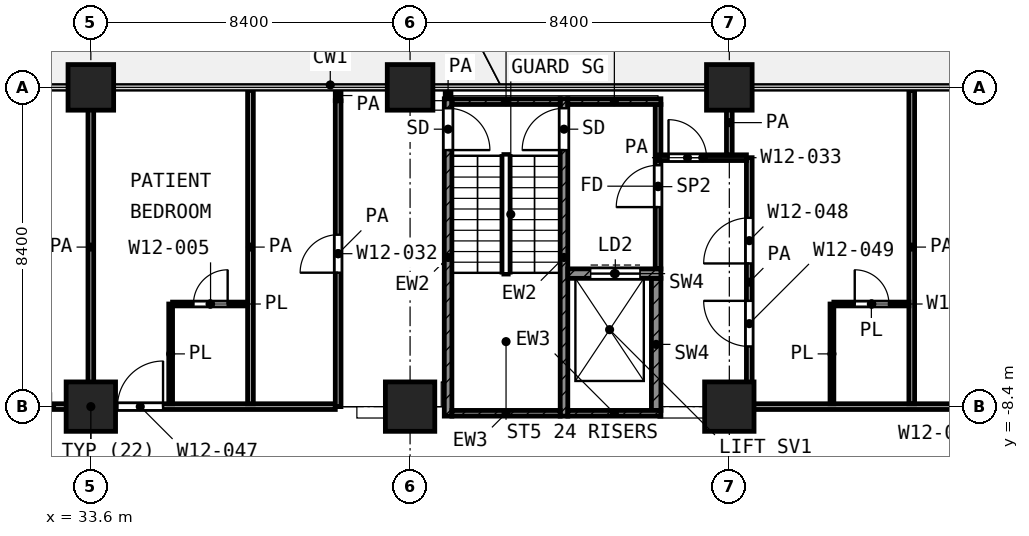
"""IFC4 building model, lengths in metres.
Left out: names, types, materials, properties, quantities, classifications, styles, units other than length and angle.
Written with IfcOpenShell. Run it as: python <this file> out.ifc"""

import sys

from ifc_helpers import new_model, si_unit, direction, frame, frame_2d, origin, origin_2d, place, context, subcontext, project, spatial, rectangle, extrude, element, fill, save


model = new_model("IFC4")
c1 = context("Model", 3, precision=1e-05, world=origin(), true_north=direction((0.0, 1.0)))
c2 = subcontext(c1, "Body", "Model", "MODEL_VIEW")
j1 = project(units=[si_unit("LENGTHUNIT", "METRE"), si_unit("PLANEANGLEUNIT", "RADIAN")], contexts=[c1])
p1 = place(None, origin())
s1 = spatial("IfcSite", under=j1, at=p1, CompositionType="ELEMENT")
p2 = place(p1, origin())
s2 = spatial("IfcBuilding", under=s1, at=p2, CompositionType="ELEMENT")
p3 = place(p2, frame((0.0, 0.0, 77.0)))
s3 = spatial("IfcBuildingStorey", under=s2, at=p3, CompositionType="ELEMENT", Elevation=77.0)
for number, where, z_axis, x_axis in (
    (1, (33.6, 0.0, 0.0), (0.0, 0.0, 1.0), (1.0, 0.0, 0.0)),
    (2, (42.0, 0.0, 0.0), (0.0, 0.0, 1.0), (1.0, 0.0, 0.0)),
    (3, (50.4, 0.0, 0.0), (0.0, 0.0, 1.0), (1.0, 0.0, 0.0)),
):
    element("IfcColumn", number, at=place(p3, frame(where, z_axis=z_axis, x_axis=x_axis)), inside=s3, PredefinedType="COLUMN", context=c2, shape_type="SweptSolid", body=[
        extrude(rectangle(XDim=1.2, YDim=1.2, at=origin_2d()), origin(), (0.0, 0.0, 1.0), 4.2),
    ])
for number, where, z_axis, x_axis in (
    (4, (33.6, -8.4, 0.0), (0.0, 0.0, 1.0), (1.0, 0.0, 0.0)),
    (5, (42.0, -8.4, 0.0), (0.0, 0.0, 1.0), (1.0, 0.0, 0.0)),
    (6, (50.4, -8.4, 0.0), (0.0, 0.0, 1.0), (1.0, 0.0, 0.0)),
):
    element("IfcColumn", number, at=place(p3, frame(where, z_axis=z_axis, x_axis=x_axis)), inside=s3, PredefinedType="COLUMN", context=c2, shape_type="SweptSolid", body=[
        extrude(rectangle(XDim=1.3, YDim=1.3, at=origin_2d()), origin(), (0.0, 0.0, 1.0), 4.2),
    ])
p4 = place(p3, frame((43.0, -8.65, 0.0), z_axis=(0.0, 0.0, 1.0), x_axis=(0.0, 1.0, 0.0)))
e7 = element("IfcWall", 7, at=p4, inside=s3, PredefinedType="SHEAR", context=c2, shape_type="SweptSolid", body=[
    extrude(rectangle(XDim=8.35, YDim=0.2, at=frame_2d((4.175, 0.0))), origin(), (0.0, 0.0, 1.0), 3.9),
])
p5 = place(p4, frame((7.0, 0.0, 0.0)))
e8 = element("IfcOpeningElement", 8, at=p5, cuts=e7, PredefinedType="OPENING", context=c2, shape_type="SweptSolid", body=[
    extrude(rectangle(XDim=1.1, YDim=2.1, at=frame_2d((0.55, 1.05))), frame((0.0, 0.11, 0.0), z_axis=(0.0, -1.0, 0.0), x_axis=(1.0, 0.0, 0.0)), (0.0, 0.0, 1.0), 0.22),
])
p6 = place(p3, frame((46.05, -8.65, 0.0), z_axis=(0.0, 0.0, 1.0), x_axis=(0.0, 1.0, 0.0)))
e9 = element("IfcWall", 9, at=p6, inside=s3, PredefinedType="SHEAR", context=c2, shape_type="SweptSolid", body=[
    extrude(rectangle(XDim=8.35, YDim=0.2, at=frame_2d((4.175, 0.0))), origin(), (0.0, 0.0, 1.0), 3.9),
])
p7 = place(p6, frame((7.0, 0.0, 0.0)))
e10 = element("IfcOpeningElement", 10, at=p7, cuts=e9, PredefinedType="OPENING", context=c2, shape_type="SweptSolid", body=[
    extrude(rectangle(XDim=1.1, YDim=2.1, at=frame_2d((0.55, 1.05))), frame((0.0, 0.11, 0.0), z_axis=(0.0, -1.0, 0.0), x_axis=(1.0, 0.0, 0.0)), (0.0, 0.0, 1.0), 0.22),
])
p8 = place(p3, frame((43.1, -0.375, 0.0), z_axis=(0.0, 0.0, 1.0), x_axis=(1.0, 0.0, 0.0)))
e11 = element("IfcWall", 11, at=p8, inside=s3, PredefinedType="SHEAR", context=c2, shape_type="SweptSolid", body=[
    extrude(rectangle(XDim=2.85, YDim=0.15, at=frame_2d((1.425, 0.0))), origin(), (0.0, 0.0, 1.0), 3.9),
])
p9 = place(p3, frame((46.15, -0.375, 0.0), z_axis=(0.0, 0.0, 1.0), x_axis=(1.0, 0.0, 0.0)))
e12 = element("IfcWall", 12, at=p9, inside=s3, PredefinedType="SHEAR", context=c2, shape_type="SweptSolid", body=[
    extrude(rectangle(XDim=2.45, YDim=0.15, at=frame_2d((1.225, 0.0))), origin(), (0.0, 0.0, 1.0), 3.9),
])
p10 = place(p3, frame((43.1, -8.575, 0.0), z_axis=(0.0, 0.0, 1.0), x_axis=(1.0, 0.0, 0.0)))
e13 = element("IfcWall", 13, at=p10, inside=s3, PredefinedType="SHEAR", context=c2, shape_type="SweptSolid", body=[
    extrude(rectangle(XDim=2.85, YDim=0.15, at=frame_2d((1.425, 0.0))), origin(), (0.0, 0.0, 1.0), 3.9),
])
p11 = place(p3, frame((46.15, -8.575, 0.0), z_axis=(0.0, 0.0, 1.0), x_axis=(1.0, 0.0, 0.0)))
e14 = element("IfcWall", 14, at=p11, inside=s3, PredefinedType="SHEAR", context=c2, shape_type="SweptSolid", body=[
    extrude(rectangle(XDim=2.45, YDim=0.15, at=frame_2d((1.225, 0.0))), origin(), (0.0, 0.0, 1.0), 3.9),
])
p12 = place(p3, frame((46.15, -4.9, 0.0), z_axis=(0.0, 0.0, 1.0), x_axis=(1.0, 0.0, 0.0)))
e15 = element("IfcWall", 15, at=p12, inside=s3, PredefinedType="SHEAR", context=c2, shape_type="SweptSolid", body=[
    extrude(rectangle(XDim=2.45, YDim=0.25, at=frame_2d((1.225, 0.0))), origin(), (0.0, 0.0, 1.0), 3.9),
])
p13 = place(p12, frame((0.6, 0.0, 0.0)))
e16 = element("IfcOpeningElement", 16, at=p13, cuts=e15, PredefinedType="OPENING", context=c2, shape_type="SweptSolid", body=[
    extrude(rectangle(XDim=1.3, YDim=2.1, at=frame_2d((0.65, 1.05))), frame((0.0, 0.135, 0.0), z_axis=(0.0, -1.0, 0.0), x_axis=(1.0, 0.0, 0.0)), (0.0, 0.0, 1.0), 0.27),
])
p14 = place(p3, frame((48.475, -8.5, 0.0), z_axis=(0.0, 0.0, 1.0), x_axis=(0.0, 1.0, 0.0)))
e17 = element("IfcWall", 17, at=p14, inside=s3, PredefinedType="SHEAR", context=c2, shape_type="SweptSolid", body=[
    extrude(rectangle(XDim=3.475, YDim=0.25, at=frame_2d((1.738, 0.0))), origin(), (0.0, 0.0, 1.0), 3.9),
])
p15 = place(p3, frame((48.525, -4.775, 0.0), z_axis=(0.0, 0.0, 1.0), x_axis=(0.0, 1.0, 0.0)))
e18 = element("IfcWall", 18, at=p15, inside=s3, PredefinedType="PARTITIONING", context=c2, shape_type="SweptSolid", body=[
    extrude(rectangle(XDim=4.325, YDim=0.15, at=frame_2d((2.163, 0.0))), origin(), (0.0, 0.0, 1.0), 3.9),
])
p16 = place(p15, frame((1.625, 0.0, 0.0)))
e19 = element("IfcOpeningElement", 19, at=p16, cuts=e18, PredefinedType="OPENING", context=c2, shape_type="SweptSolid", body=[
    extrude(rectangle(XDim=1.1, YDim=2.1, at=frame_2d((0.55, 1.05))), frame((0.0, 0.085, 0.0), z_axis=(0.0, -1.0, 0.0), x_axis=(1.0, 0.0, 0.0)), (0.0, 0.0, 1.0), 0.17),
])
p17 = place(p3, frame((35.75, -5.7, 0.0), z_axis=(0.0, 0.0, 1.0), x_axis=(1.0, 0.0, 0.0)))
e20 = element("IfcWall", 20, at=p17, inside=s3, PredefinedType="PARTITIONING", context=c2, shape_type="SweptSolid", body=[
    extrude(rectangle(XDim=1.975, YDim=0.1, at=frame_2d((0.988, 0.0))), origin(), (0.0, 0.0, 1.0), 3.9),
])
p18 = place(p17, frame((0.55, 0.0, 0.0)))
e21 = element("IfcOpeningElement", 21, at=p18, cuts=e20, PredefinedType="OPENING", context=c2, shape_type="SweptSolid", body=[
    extrude(rectangle(XDim=0.9, YDim=2.1, at=frame_2d((0.45, 1.05))), frame((0.0, 0.06, 0.0), z_axis=(0.0, -1.0, 0.0), x_axis=(1.0, 0.0, 0.0)), (0.0, 0.0, 1.0), 0.12),
])
p19 = place(p3, frame((53.15, -5.7, 0.0), z_axis=(0.0, 0.0, 1.0), x_axis=(1.0, 0.0, 0.0)))
e22 = element("IfcWall", 22, at=p19, inside=s3, PredefinedType="PARTITIONING", context=c2, shape_type="SweptSolid", body=[
    extrude(rectangle(XDim=1.975, YDim=0.1, at=frame_2d((0.988, 0.0))), origin(), (0.0, 0.0, 1.0), 3.9),
])
p20 = place(p19, frame((0.55, 0.0, 0.0)))
e23 = element("IfcOpeningElement", 23, at=p20, cuts=e22, PredefinedType="OPENING", context=c2, shape_type="SweptSolid", body=[
    extrude(rectangle(XDim=0.9, YDim=2.1, at=frame_2d((0.45, 1.05))), frame((0.0, 0.06, 0.0), z_axis=(0.0, -1.0, 0.0), x_axis=(1.0, 0.0, 0.0)), (0.0, 0.0, 1.0), 0.12),
])
for number, where, z_axis, x_axis in (
    (24, (35.7, -8.325, 0.0), (0.0, 0.0, 1.0), (0.0, 1.0, 0.0)),
    (25, (53.1, -8.325, 0.0), (0.0, 0.0, 1.0), (0.0, 1.0, 0.0)),
):
    element("IfcWall", number, at=place(p3, frame(where, z_axis=z_axis, x_axis=x_axis)), inside=s3, PredefinedType="PARTITIONING", context=c2, shape_type="SweptSolid", body=[
        extrude(rectangle(XDim=2.625, YDim=0.1, at=frame_2d((1.312, 0.0))), origin(), (0.0, 0.0, 1.0), 3.9),
    ])
p21 = place(p3, frame((25.1, -8.4, 0.0), z_axis=(0.0, 0.0, 1.0), x_axis=(1.0, 0.0, 0.0)))
e26 = element("IfcWall", 26, at=p21, inside=s3, PredefinedType="PARTITIONING", context=c2, shape_type="SweptSolid", body=[
    extrude(rectangle(XDim=14.932, YDim=0.15, at=frame_2d((7.466, 0.0))), origin(), (0.0, 0.0, 1.0), 3.9),
])
p22 = place(p21, frame((3.55, 0.0, 0.0)))
e27 = element("IfcOpeningElement", 27, at=p22, cuts=e26, PredefinedType="OPENING", context=c2, shape_type="SweptSolid", body=[
    extrude(rectangle(XDim=1.5, YDim=2.1, at=frame_2d((0.75, 1.05))), frame((0.0, 0.085, 0.0), z_axis=(0.0, -1.0, 0.0), x_axis=(1.0, 0.0, 0.0)), (0.0, 0.0, 1.0), 0.17),
])
p23 = place(p21, frame((9.2, 0.0, 0.0)))
e28 = element("IfcOpeningElement", 28, at=p23, cuts=e26, PredefinedType="OPENING", context=c2, shape_type="SweptSolid", body=[
    extrude(rectangle(XDim=1.2, YDim=2.1, at=frame_2d((0.6, 1.05))), frame((0.0, 0.085, 0.0), z_axis=(0.0, -1.0, 0.0), x_axis=(1.0, 0.0, 0.0)), (0.0, 0.0, 1.0), 0.17),
])
p24 = place(p3, frame((51.0, -8.4, 0.0), z_axis=(0.0, 0.0, 1.0), x_axis=(1.0, 0.0, 0.0)))
e29 = element("IfcWall", 29, at=p24, inside=s3, PredefinedType="PARTITIONING", context=c2, shape_type="SweptSolid", body=[
    extrude(rectangle(XDim=23.95, YDim=0.15, at=frame_2d((11.975, 0.0))), origin(), (0.0, 0.0, 1.0), 3.9),
])
p25 = place(p24, frame((5.4, 0.0, 0.0)))
e30 = element("IfcOpeningElement", 30, at=p25, cuts=e29, PredefinedType="OPENING", context=c2, shape_type="SweptSolid", body=[
    extrude(rectangle(XDim=1.2, YDim=2.1, at=frame_2d((0.6, 1.05))), frame((0.0, 0.085, 0.0), z_axis=(0.0, -1.0, 0.0), x_axis=(1.0, 0.0, 0.0)), (0.0, 0.0, 1.0), 0.17),
])
p26 = place(p24, frame((8.5, 0.0, 0.0)))
e31 = element("IfcOpeningElement", 31, at=p26, cuts=e29, PredefinedType="OPENING", context=c2, shape_type="SweptSolid", body=[
    extrude(rectangle(XDim=0.9, YDim=2.1, at=frame_2d((0.45, 1.05))), frame((0.0, 0.085, 0.0), z_axis=(0.0, -1.0, 0.0), x_axis=(1.0, 0.0, 0.0)), (0.0, 0.0, 1.0), 0.17),
])
p27 = place(p24, frame((14.0, 0.0, 0.0)))
e32 = element("IfcOpeningElement", 32, at=p27, cuts=e29, PredefinedType="OPENING", context=c2, shape_type="SweptSolid", body=[
    extrude(rectangle(XDim=1.2, YDim=2.1, at=frame_2d((0.6, 1.05))), frame((0.0, 0.085, 0.0), z_axis=(0.0, -1.0, 0.0), x_axis=(1.0, 0.0, 0.0)), (0.0, 0.0, 1.0), 0.17),
])
p28 = place(p24, frame((16.9, 0.0, 0.0)))
e33 = element("IfcOpeningElement", 33, at=p28, cuts=e29, PredefinedType="OPENING", context=c2, shape_type="SweptSolid", body=[
    extrude(rectangle(XDim=1.2, YDim=2.1, at=frame_2d((0.6, 1.05))), frame((0.0, 0.085, 0.0), z_axis=(0.0, -1.0, 0.0), x_axis=(1.0, 0.0, 0.0)), (0.0, 0.0, 1.0), 0.17),
])
p29 = place(p24, frame((21.825, 0.0, 0.0)))
e34 = element("IfcOpeningElement", 34, at=p29, cuts=e29, PredefinedType="OPENING", context=c2, shape_type="SweptSolid", body=[
    extrude(rectangle(XDim=1.0, YDim=2.1, at=frame_2d((0.5, 1.05))), frame((0.0, 0.085, 0.0), z_axis=(0.0, -1.0, 0.0), x_axis=(1.0, 0.0, 0.0)), (0.0, 0.0, 1.0), 0.17),
])
p30 = place(p3, frame((48.55, -1.85, 0.0), z_axis=(0.0, 0.0, 1.0), x_axis=(1.0, 0.0, 0.0)))
e35 = element("IfcWall", 35, at=p30, inside=s3, PredefinedType="PARTITIONING", context=c2, shape_type="SweptSolid", body=[
    extrude(rectangle(XDim=2.3, YDim=0.15, at=frame_2d((1.15, 0.0))), origin(), (0.0, 0.0, 1.0), 3.9),
])
p31 = place(p30, frame((0.25, 0.0, 0.0)))
e36 = element("IfcOpeningElement", 36, at=p31, cuts=e35, PredefinedType="OPENING", context=c2, shape_type="SweptSolid", body=[
    extrude(rectangle(XDim=1.0, YDim=2.1, at=frame_2d((0.5, 1.05))), frame((0.0, 0.085, 0.0), z_axis=(0.0, -1.0, 0.0), x_axis=(1.0, 0.0, 0.0)), (0.0, 0.0, 1.0), 0.17),
])
for number, where, z_axis, x_axis in (
    (37, (33.6, -8.325, 0.0), (0.0, 0.0, 1.0), (0.0, 1.0, 0.0)),
    (38, (37.8, -8.325, 0.0), (0.0, 0.0, 1.0), (0.0, 1.0, 0.0)),
):
    element("IfcWall", number, at=place(p3, frame(where, z_axis=z_axis, x_axis=x_axis)), inside=s3, PredefinedType="PARTITIONING", context=c2, shape_type="SweptSolid", body=[
        extrude(rectangle(XDim=8.245, YDim=0.15, at=frame_2d((4.123, 0.0))), origin(), (0.0, 0.0, 1.0), 3.9),
    ])
p32 = place(p3, frame((40.107, -8.4, 0.0), z_axis=(0.0, 0.0, 1.0), x_axis=(0.0, 1.0, 0.0)))
e39 = element("IfcWall", 39, at=p32, inside=s3, PredefinedType="PARTITIONING", context=c2, shape_type="SweptSolid", body=[
    extrude(rectangle(XDim=8.048, YDim=0.15, at=frame_2d((4.024, 0.0))), origin(), (0.0, 0.0, 1.0), 3.9),
])
p33 = place(p32, frame((3.524, 0.0, 0.0)))
e40 = element("IfcOpeningElement", 40, at=p33, cuts=e39, PredefinedType="OPENING", context=c2, shape_type="SweptSolid", body=[
    extrude(rectangle(XDim=1.0, YDim=2.1, at=frame_2d((0.5, 1.05))), frame((0.0, 0.085, 0.0), z_axis=(0.0, -1.0, 0.0), x_axis=(1.0, 0.0, 0.0)), (0.0, 0.0, 1.0), 0.17),
])
p34 = place(p3, frame((40.107, -0.35, 0.0), z_axis=(0.0, 0.0, 1.0), x_axis=(0.0, 1.0, 0.0)))
e41 = element("IfcWall", 41, at=p34, inside=s3, PredefinedType="PARTITIONING", context=c2, shape_type="SweptSolid", body=[
    extrude(rectangle(XDim=0.27, YDim=0.15, at=frame_2d((0.135, 0.0))), origin(), (0.0, 0.0, 1.0), 3.9),
])
p35 = place(p3, frame((43.0, -0.27, 0.0), z_axis=(0.0, 0.0, 1.0), x_axis=(0.0, 1.0, 0.0)))
e42 = element("IfcWall", 42, at=p35, inside=s3, PredefinedType="PARTITIONING", context=c2, shape_type="SweptSolid", body=[
    extrude(rectangle(XDim=0.19, YDim=0.15, at=frame_2d((0.095, 0.0))), origin(), (0.0, 0.0, 1.0), 3.9),
])
p36 = place(p3, frame((50.4, -1.775, 0.0), z_axis=(0.0, 0.0, 1.0), x_axis=(0.0, 1.0, 0.0)))
e43 = element("IfcWall", 43, at=p36, inside=s3, PredefinedType="PARTITIONING", context=c2, shape_type="SweptSolid", body=[
    extrude(rectangle(XDim=1.695, YDim=0.15, at=frame_2d((0.847, 0.0))), origin(), (0.0, 0.0, 1.0), 3.9),
])
p37 = place(p3, frame((50.925, -8.4, 0.0), z_axis=(0.0, 0.0, 1.0), x_axis=(0.0, 1.0, 0.0)))
e44 = element("IfcWall", 44, at=p37, inside=s3, PredefinedType="PARTITIONING", context=c2, shape_type="SweptSolid", body=[
    extrude(rectangle(XDim=6.55, YDim=0.15, at=frame_2d((3.275, 0.0))), origin(), (0.0, 0.0, 1.0), 3.9),
])
p38 = place(p37, frame((3.767, 0.0, 0.0)))
e45 = element("IfcOpeningElement", 45, at=p38, cuts=e44, PredefinedType="OPENING", context=c2, shape_type="SweptSolid", body=[
    extrude(rectangle(XDim=1.2, YDim=2.1, at=frame_2d((0.6, 1.05))), frame((0.0, 0.085, 0.0), z_axis=(0.0, -1.0, 0.0), x_axis=(1.0, 0.0, 0.0)), (0.0, 0.0, 1.0), 0.17),
])
p39 = place(p37, frame((1.583, 0.0, 0.0)))
e46 = element("IfcOpeningElement", 46, at=p39, cuts=e44, PredefinedType="OPENING", context=c2, shape_type="SweptSolid", body=[
    extrude(rectangle(XDim=1.2, YDim=2.1, at=frame_2d((0.6, 1.05))), frame((0.0, 0.085, 0.0), z_axis=(0.0, -1.0, 0.0), x_axis=(1.0, 0.0, 0.0)), (0.0, 0.0, 1.0), 0.17),
])
p40 = place(p3, frame((55.2, -8.325, 0.0), z_axis=(0.0, 0.0, 1.0), x_axis=(0.0, 1.0, 0.0)))
e47 = element("IfcWall", 47, at=p40, inside=s3, PredefinedType="PARTITIONING", context=c2, shape_type="SweptSolid", body=[
    extrude(rectangle(XDim=8.245, YDim=0.15, at=frame_2d((4.123, 0.0))), origin(), (0.0, 0.0, 1.0), 3.9),
])
p41 = place(p5, frame((1.1, 0.0, 0.0), z_axis=(0.0, 0.0, 1.0), x_axis=(-1.0, 0.0, 0.0)))
e48 = element("IfcDoor", 48, at=p41, inside=s3, OperationType="SINGLE_SWING_LEFT", PredefinedType="DOOR", context=c2, shape_type="SweptSolid", body=[
    extrude(rectangle(XDim=1.1, YDim=2.1, at=frame_2d((0.55, 1.05))), frame((0.0, 0.025, 0.0), z_axis=(0.0, -1.0, 0.0), x_axis=(1.0, 0.0, 0.0)), (0.0, 0.0, 1.0), 0.05),
])
fill(e8, e48)
p42 = place(p7, origin())
e49 = element("IfcDoor", 49, at=p42, inside=s3, OperationType="SINGLE_SWING_LEFT", PredefinedType="DOOR", context=c2, shape_type="SweptSolid", body=[
    extrude(rectangle(XDim=1.1, YDim=2.1, at=frame_2d((0.55, 1.05))), frame((0.0, 0.025, 0.0), z_axis=(0.0, -1.0, 0.0), x_axis=(1.0, 0.0, 0.0)), (0.0, 0.0, 1.0), 0.05),
])
fill(e10, e49)
p43 = place(p13, origin())
e50 = element("IfcDoor", 50, at=p43, inside=s3, OperationType="DOUBLE_DOOR_SLIDING", PredefinedType="DOOR", context=c2, shape_type="SweptSolid", body=[
    extrude(rectangle(XDim=1.3, YDim=2.1, at=frame_2d((0.65, 1.05))), frame((0.0, 0.025, 0.0), z_axis=(0.0, -1.0, 0.0), x_axis=(1.0, 0.0, 0.0)), (0.0, 0.0, 1.0), 0.05),
])
fill(e16, e50)
p44 = place(p16, origin())
e51 = element("IfcDoor", 51, at=p44, inside=s3, OperationType="SINGLE_SWING_LEFT", PredefinedType="DOOR", context=c2, shape_type="SweptSolid", body=[
    extrude(rectangle(XDim=1.1, YDim=2.1, at=frame_2d((0.55, 1.05))), frame((0.0, 0.025, 0.0), z_axis=(0.0, -1.0, 0.0), x_axis=(1.0, 0.0, 0.0)), (0.0, 0.0, 1.0), 0.05),
])
fill(e19, e51)
p45 = place(p23, origin())
e52 = element("IfcDoor", 52, at=p45, inside=s3, OperationType="SINGLE_SWING_RIGHT", PredefinedType="DOOR", context=c2, shape_type="SweptSolid", body=[
    extrude(rectangle(XDim=1.2, YDim=2.1, at=frame_2d((0.6, 1.05))), frame((0.0, 0.025, 0.0), z_axis=(0.0, -1.0, 0.0), x_axis=(1.0, 0.0, 0.0)), (0.0, 0.0, 1.0), 0.05),
])
fill(e28, e52)
p46 = place(p18, origin())
e53 = element("IfcDoor", 53, at=p46, inside=s3, OperationType="SINGLE_SWING_RIGHT", PredefinedType="DOOR", context=c2, shape_type="SweptSolid", body=[
    extrude(rectangle(XDim=0.9, YDim=2.1, at=frame_2d((0.45, 1.05))), frame((0.0, 0.025, 0.0), z_axis=(0.0, -1.0, 0.0), x_axis=(1.0, 0.0, 0.0)), (0.0, 0.0, 1.0), 0.05),
])
fill(e21, e53)
p47 = place(p33, origin())
e54 = element("IfcDoor", 54, at=p47, inside=s3, OperationType="SINGLE_SWING_LEFT", PredefinedType="DOOR", context=c2, shape_type="SweptSolid", body=[
    extrude(rectangle(XDim=1.0, YDim=2.1, at=frame_2d((0.5, 1.05))), frame((0.0, 0.025, 0.0), z_axis=(0.0, -1.0, 0.0), x_axis=(1.0, 0.0, 0.0)), (0.0, 0.0, 1.0), 0.05),
])
fill(e40, e54)
p48 = place(p31, origin())
e55 = element("IfcDoor", 55, at=p48, inside=s3, OperationType="SINGLE_SWING_LEFT", PredefinedType="DOOR", context=c2, shape_type="SweptSolid", body=[
    extrude(rectangle(XDim=1.0, YDim=2.1, at=frame_2d((0.5, 1.05))), frame((0.0, 0.025, 0.0), z_axis=(0.0, -1.0, 0.0), x_axis=(1.0, 0.0, 0.0)), (0.0, 0.0, 1.0), 0.05),
])
fill(e36, e55)
p49 = place(p38, origin())
e56 = element("IfcDoor", 56, at=p49, inside=s3, OperationType="SINGLE_SWING_LEFT", PredefinedType="DOOR", context=c2, shape_type="SweptSolid", body=[
    extrude(rectangle(XDim=1.2, YDim=2.1, at=frame_2d((0.6, 1.05))), frame((0.0, 0.025, 0.0), z_axis=(0.0, -1.0, 0.0), x_axis=(1.0, 0.0, 0.0)), (0.0, 0.0, 1.0), 0.05),
])
fill(e45, e56)
p50 = place(p39, origin())
e57 = element("IfcDoor", 57, at=p50, inside=s3, OperationType="SINGLE_SWING_RIGHT", PredefinedType="DOOR", context=c2, shape_type="SweptSolid", body=[
    extrude(rectangle(XDim=1.2, YDim=2.1, at=frame_2d((0.6, 1.05))), frame((0.0, 0.025, 0.0), z_axis=(0.0, -1.0, 0.0), x_axis=(1.0, 0.0, 0.0)), (0.0, 0.0, 1.0), 0.05),
])
fill(e46, e57)
p51 = place(p20, origin())
e58 = element("IfcDoor", 58, at=p51, inside=s3, OperationType="SINGLE_SWING_LEFT", PredefinedType="DOOR", context=c2, shape_type="SweptSolid", body=[
    extrude(rectangle(XDim=0.9, YDim=2.1, at=frame_2d((0.45, 1.05))), frame((0.0, 0.025, 0.0), z_axis=(0.0, -1.0, 0.0), x_axis=(1.0, 0.0, 0.0)), (0.0, 0.0, 1.0), 0.05),
])
fill(e23, e58)
save(model, sys.argv[1])
